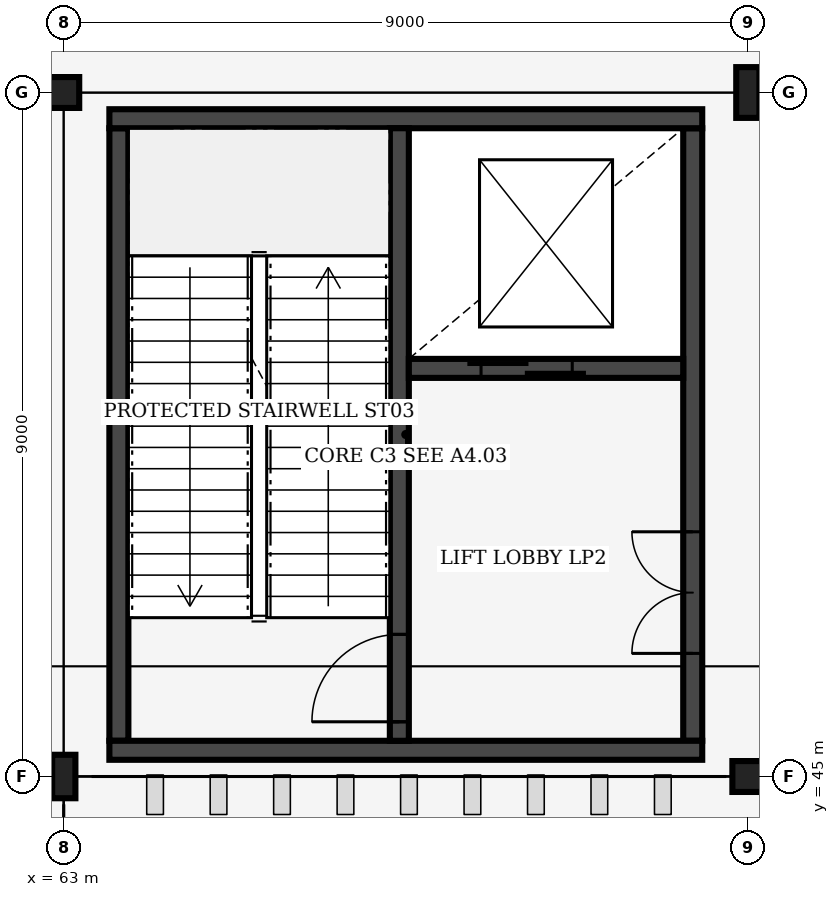
"""IFC4 building model, lengths in metres.
Left out: names, types, materials, properties, quantities, classifications, styles, units other than length and angle.
Written with IfcOpenShell. Run it as: python <this file> out.ifc"""

import sys

from ifc_helpers import new_model, si_unit, direction, frame, frame_2d, origin, origin_2d, place, context, subcontext, project, spatial, rectangle, hollow_circle, i_section, extrude, element, fill, save


model = new_model("IFC4")
c1 = context("Model", 3, precision=1e-05, world=origin(), true_north=direction((0.0, 1.0)))
c2 = subcontext(c1, "Body", "Model", "MODEL_VIEW")
j1 = project(units=[si_unit("LENGTHUNIT", "METRE"), si_unit("PLANEANGLEUNIT", "RADIAN")], contexts=[c1])
p1 = place(None, origin())
s1 = spatial("IfcSite", under=j1, at=p1, CompositionType="ELEMENT")
p2 = place(p1, origin())
s2 = spatial("IfcBuilding", under=s1, at=p2, CompositionType="ELEMENT")
p3 = place(p2, frame((0.0, 0.0, 6.0)))
s3 = spatial("IfcBuildingStorey", under=s2, at=p3, CompositionType="ELEMENT", Elevation=6.0)
p4 = place(p3, frame((63.0, 45.0, 0.0), z_axis=(0.0, 0.0, 1.0), x_axis=(1.0, 0.0, 0.0)))
e1 = element("IfcColumn", 1, at=p4, inside=s3, PredefinedType="COLUMN", context=c2, shape_type="SweptSolid", body=[
    extrude(i_section(OverallWidth=0.306, OverallDepth=0.572, WebThickness=0.021, FlangeThickness=0.04, FilletRadius=0.027, at=origin_2d()), origin(), (0.0, 0.0, 1.0), 6.0),
])
for number, where, z_axis, x_axis in (
    (2, (63.0, 54.0, 0.0), (0.0, 0.0, 1.0), (1.0, 0.0, 0.0)),
    (3, (72.0, 45.0, 0.0), (0.0, 0.0, 1.0), (1.0, 0.0, 0.0)),
):
    element("IfcColumn", number, at=place(p3, frame(where, z_axis=z_axis, x_axis=x_axis)), inside=s3, PredefinedType="COLUMN", context=c2, shape_type="SweptSolid", body=[
        extrude(hollow_circle(Radius=0.203, WallThickness=0.016, at=origin_2d()), origin(), (0.0, 0.0, 1.0), 6.0),
    ])
p5 = place(p3, frame((72.0, 54.0, 0.0), z_axis=(0.0, 0.0, 1.0), x_axis=(1.0, 0.0, 0.0)))
e4 = element("IfcColumn", 4, at=p5, inside=s3, PredefinedType="COLUMN", context=c2, shape_type="SweptSolid", body=[
    extrude(i_section(OverallWidth=0.305, OverallDepth=0.668, WebThickness=0.021, FlangeThickness=0.04, FilletRadius=0.027, at=origin_2d()), origin(), (0.0, 0.0, 1.0), 6.0),
])
p6 = place(p3, frame((63.725, 45.47, 0.0), z_axis=(0.0, 0.0, 1.0), x_axis=(0.0, 1.0, 0.0)))
e5 = element("IfcWall", 5, at=p6, inside=s3, PredefinedType="SHEAR", context=c2, shape_type="SweptSolid", body=[
    extrude(rectangle(XDim=8.06, YDim=0.25, at=frame_2d((4.03, 0.0))), origin(), (0.0, 0.0, 1.0), 5.71),
])
p7 = place(p3, frame((71.275, 45.47, 0.0), z_axis=(0.0, 0.0, 1.0), x_axis=(0.0, 1.0, 0.0)))
e6 = element("IfcWall", 6, at=p7, inside=s3, PredefinedType="SHEAR", context=c2, shape_type="SweptSolid", body=[
    extrude(rectangle(XDim=8.06, YDim=0.25, at=frame_2d((4.03, 0.0))), origin(), (0.0, 0.0, 1.0), 5.71),
])
p8 = place(p7, frame((1.15, 0.0, 0.0)))
e7 = element("IfcOpeningElement", 7, at=p8, cuts=e6, PredefinedType="OPENING", context=c2, shape_type="SweptSolid", body=[
    extrude(rectangle(XDim=1.6, YDim=2.2, at=frame_2d((0.8, 1.1))), frame((0.0, 0.135, 0.0), z_axis=(0.0, -1.0, 0.0), x_axis=(1.0, 0.0, 0.0)), (0.0, 0.0, 1.0), 0.27),
])
for number, where, z_axis, x_axis in (
    (8, (63.6, 45.345, 0.0), (0.0, 0.0, 1.0), (1.0, 0.0, 0.0)),
    (9, (63.6, 53.655, 0.0), (0.0, 0.0, 1.0), (1.0, 0.0, 0.0)),
):
    element("IfcWall", number, at=place(p3, frame(where, z_axis=z_axis, x_axis=x_axis)), inside=s3, PredefinedType="SHEAR", context=c2, shape_type="SweptSolid", body=[
        extrude(rectangle(XDim=7.8, YDim=0.25, at=frame_2d((3.9, 0.0))), origin(), (0.0, 0.0, 1.0), 5.71),
    ])
p9 = place(p3, frame((67.415, 45.47, 0.0), z_axis=(0.0, 0.0, 1.0), x_axis=(0.0, 1.0, 0.0)))
e10 = element("IfcWall", 10, at=p9, inside=s3, PredefinedType="SHEAR", context=c2, shape_type="SweptSolid", body=[
    extrude(rectangle(XDim=8.06, YDim=0.25, at=frame_2d((4.03, 0.0))), origin(), (0.0, 0.0, 1.0), 5.71),
])
p10 = place(p9, frame((0.25, 0.0, 0.0)))
e11 = element("IfcOpeningElement", 11, at=p10, cuts=e10, PredefinedType="OPENING", context=c2, shape_type="SweptSolid", body=[
    extrude(rectangle(XDim=1.15, YDim=2.15, at=frame_2d((0.575, 1.075))), frame((0.0, 0.135, 0.0), z_axis=(0.0, -1.0, 0.0), x_axis=(1.0, 0.0, 0.0)), (0.0, 0.0, 1.0), 0.27),
])
p11 = place(p3, frame((67.54, 50.37, 0.0), z_axis=(0.0, 0.0, 1.0), x_axis=(1.0, 0.0, 0.0)))
e12 = element("IfcWall", 12, at=p11, inside=s3, PredefinedType="SHEAR", context=c2, shape_type="SweptSolid", body=[
    extrude(rectangle(XDim=3.61, YDim=0.25, at=frame_2d((1.805, 0.0))), origin(), (0.0, 0.0, 1.0), 5.71),
])
p12 = place(p11, frame((0.95, 0.0, 0.0)))
e13 = element("IfcOpeningElement", 13, at=p12, cuts=e12, PredefinedType="OPENING", context=c2, shape_type="SweptSolid", body=[
    extrude(rectangle(XDim=1.2, YDim=2.2, at=frame_2d((0.6, 1.1))), frame((0.0, 0.135, 0.0), z_axis=(0.0, -1.0, 0.0), x_axis=(1.0, 0.0, 0.0)), (0.0, 0.0, 1.0), 0.27),
])
p13 = place(p10, origin())
e14 = element("IfcDoor", 14, at=p13, inside=s3, OperationType="SINGLE_SWING_LEFT", PredefinedType="DOOR", context=c2, shape_type="SweptSolid", body=[
    extrude(rectangle(XDim=1.15, YDim=2.15, at=frame_2d((0.575, 1.075))), frame((0.0, 0.025, 0.0), z_axis=(0.0, -1.0, 0.0), x_axis=(1.0, 0.0, 0.0)), (0.0, 0.0, 1.0), 0.05),
])
fill(e11, e14)
p14 = place(p12, origin())
e15 = element("IfcDoor", 15, at=p14, inside=s3, OperationType="DOUBLE_DOOR_SLIDING", PredefinedType="DOOR", context=c2, shape_type="SweptSolid", body=[
    extrude(rectangle(XDim=1.2, YDim=2.2, at=frame_2d((0.6, 1.1))), frame((0.0, 0.025, 0.0), z_axis=(0.0, -1.0, 0.0), x_axis=(1.0, 0.0, 0.0)), (0.0, 0.0, 1.0), 0.05),
])
fill(e13, e15)
p15 = place(p8, origin())
e16 = element("IfcDoor", 16, at=p15, inside=s3, OperationType="DOUBLE_DOOR_SINGLE_SWING", PredefinedType="DOOR", context=c2, shape_type="SweptSolid", body=[
    extrude(rectangle(XDim=1.6, YDim=2.2, at=frame_2d((0.8, 1.1))), frame((0.0, 0.025, 0.0), z_axis=(0.0, -1.0, 0.0), x_axis=(1.0, 0.0, 0.0)), (0.0, 0.0, 1.0), 0.05),
])
fill(e7, e16)
save(model, sys.argv[1])
